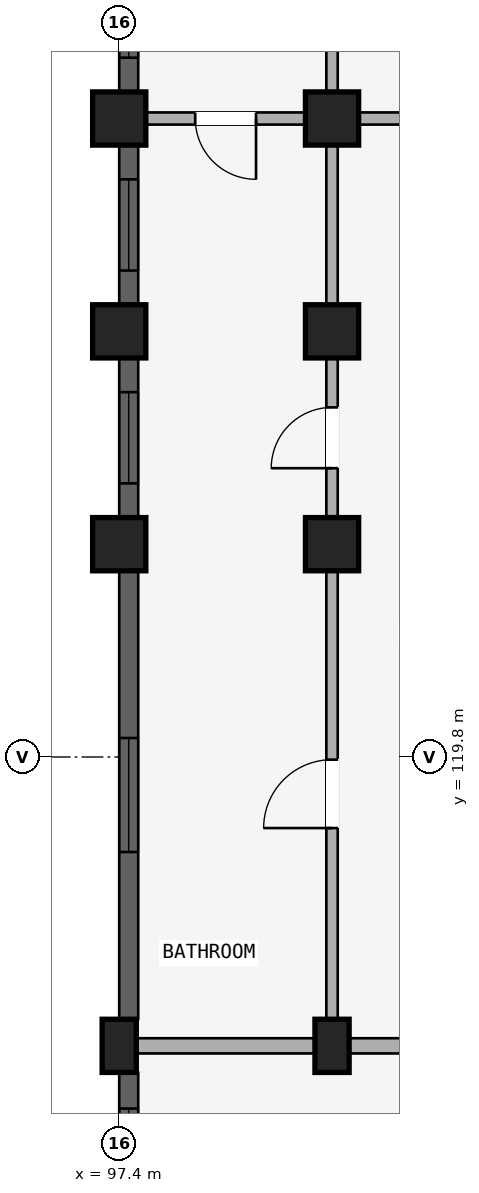
"""IFC4 building model, lengths in metres.
Left out: names, types, materials, properties, quantities, classifications, styles, units other than length and angle.
Written with IfcOpenShell. Run it as: python <this file> out.ifc"""

import sys

from ifc_helpers import new_model, si_unit, direction, frame, frame_2d, origin, origin_2d, place, context, subcontext, project, spatial, rectangle, extrude, element, fill, save


model = new_model("IFC4")
c1 = context("Model", 3, precision=1e-05, world=origin(), true_north=direction((0.0, 1.0)))
c2 = subcontext(c1, "Body", "Model", "MODEL_VIEW")
j1 = project(units=[si_unit("LENGTHUNIT", "METRE"), si_unit("PLANEANGLEUNIT", "RADIAN")], contexts=[c1])
p1 = place(None, origin())
s1 = spatial("IfcSite", under=j1, at=p1, CompositionType="ELEMENT")
p2 = place(p1, origin())
s2 = spatial("IfcBuilding", under=s1, at=p2, CompositionType="ELEMENT")
p3 = place(p2, frame((0.0, 0.0, 21.3)))
s3 = spatial("IfcBuildingStorey", under=s2, at=p3, CompositionType="ELEMENT", Elevation=21.3)
p4 = place(p3, frame((100.2, 116.0, 0.0), z_axis=(0.0, 0.0, 1.0), x_axis=(1.0, 0.0, 0.0)))
e1 = element("IfcColumn", 1, at=p4, inside=s3, PredefinedType="COLUMN", context=c2, shape_type="SweptSolid", body=[
    extrude(rectangle(XDim=0.45, YDim=0.7, at=origin_2d()), origin(), (0.0, 0.0, 1.0), 2.93),
])
for number, where, z_axis, x_axis in (
    (2, (100.2, 122.6, 0.0), (0.0, 0.0, 1.0), (1.0, 0.0, 0.0)),
    (3, (100.2, 125.4, 0.0), (0.0, 0.0, 1.0), (1.0, 0.0, 0.0)),
    (4, (100.2, 128.2, 0.0), (0.0, 0.0, 1.0), (1.0, 0.0, 0.0)),
):
    element("IfcColumn", number, at=place(p3, frame(where, z_axis=z_axis, x_axis=x_axis)), inside=s3, PredefinedType="COLUMN", context=c2, shape_type="SweptSolid", body=[
        extrude(rectangle(XDim=0.7, YDim=0.7, at=origin_2d()), origin(), (0.0, 0.0, 1.0), 2.93),
    ])
p5 = place(p3, frame((97.4, 116.0, 0.0), z_axis=(0.0, 0.0, 1.0), x_axis=(1.0, 0.0, 0.0)))
e5 = element("IfcColumn", 5, at=p5, inside=s3, PredefinedType="COLUMN", context=c2, shape_type="SweptSolid", body=[
    extrude(rectangle(XDim=0.45, YDim=0.7, at=origin_2d()), origin(), (0.0, 0.0, 1.0), 2.93),
])
for number, where, z_axis, x_axis in (
    (6, (97.4, 122.6, 0.0), (0.0, 0.0, 1.0), (1.0, 0.0, 0.0)),
    (7, (97.4, 125.4, 0.0), (0.0, 0.0, 1.0), (1.0, 0.0, 0.0)),
    (8, (97.4, 128.2, 0.0), (0.0, 0.0, 1.0), (1.0, 0.0, 0.0)),
):
    element("IfcColumn", number, at=place(p3, frame(where, z_axis=z_axis, x_axis=x_axis)), inside=s3, PredefinedType="COLUMN", context=c2, shape_type="SweptSolid", body=[
        extrude(rectangle(XDim=0.7, YDim=0.7, at=origin_2d()), origin(), (0.0, 0.0, 1.0), 2.93),
    ])
p6 = place(p3, frame((103.0, 116.0, 0.0), z_axis=(0.0, 0.0, 1.0), x_axis=(-1.0, 0.0, 0.0)))
e9 = element("IfcWall", 9, at=p6, inside=s3, PredefinedType="STANDARD", context=c2, shape_type="SweptSolid", body=[
    extrude(rectangle(XDim=2.8, YDim=0.2, at=frame_2d((1.4, 0.0))), origin(), (0.0, 0.0, 1.0), 2.372),
])
p7 = place(p6, frame((0.9, 0.0, 0.0)))
e10 = element("IfcOpeningElement", 10, at=p7, cuts=e9, PredefinedType="OPENING", context=c2, shape_type="SweptSolid", body=[
    extrude(rectangle(XDim=1.0, YDim=2.15, at=frame_2d((0.5, 1.075))), frame((0.0, 0.11, 0.0), z_axis=(0.0, -1.0, 0.0), x_axis=(1.0, 0.0, 0.0)), (0.0, 0.0, 1.0), 0.22),
])
p8 = place(p3, frame((102.92, 128.2, 0.0), z_axis=(0.0, 0.0, 1.0), x_axis=(-1.0, 0.0, 0.0)))
e11 = element("IfcWall", 11, at=p8, inside=s3, PredefinedType="PLUMBINGWALL", context=c2, shape_type="SweptSolid", body=[
    extrude(rectangle(XDim=2.64, YDim=0.16, at=frame_2d((1.32, 0.0))), origin(), (0.0, 0.0, 1.0), 2.372),
])
p9 = place(p8, frame((0.87, 0.0, 0.0)))
e12 = element("IfcOpeningElement", 12, at=p9, cuts=e11, PredefinedType="OPENING", context=c2, shape_type="SweptSolid", body=[
    extrude(rectangle(XDim=0.9, YDim=2.1, at=frame_2d((0.45, 1.05))), frame((0.0, 0.09, 0.0), z_axis=(0.0, -1.0, 0.0), x_axis=(1.0, 0.0, 0.0)), (0.0, 0.0, 1.0), 0.18),
])
p10 = place(p3, frame((100.2, 116.0, 0.0), z_axis=(0.0, 0.0, 1.0), x_axis=(-1.0, 0.0, 0.0)))
e13 = element("IfcWall", 13, at=p10, inside=s3, PredefinedType="STANDARD", context=c2, shape_type="SweptSolid", body=[
    extrude(rectangle(XDim=2.8, YDim=0.2, at=frame_2d((1.4, 0.0))), origin(), (0.0, 0.0, 1.0), 2.372),
])
p11 = place(p3, frame((100.12, 128.2, 0.0), z_axis=(0.0, 0.0, 1.0), x_axis=(-1.0, 0.0, 0.0)))
e14 = element("IfcWall", 14, at=p11, inside=s3, PredefinedType="PLUMBINGWALL", context=c2, shape_type="SweptSolid", body=[
    extrude(rectangle(XDim=2.64, YDim=0.16, at=frame_2d((1.32, 0.0))), origin(), (0.0, 0.0, 1.0), 2.372),
])
p12 = place(p11, frame((0.92, 0.0, 0.0)))
e15 = element("IfcOpeningElement", 15, at=p12, cuts=e14, PredefinedType="OPENING", context=c2, shape_type="SweptSolid", body=[
    extrude(rectangle(XDim=0.8, YDim=2.1, at=frame_2d((0.4, 1.05))), frame((0.0, 0.09, 0.0), z_axis=(0.0, -1.0, 0.0), x_axis=(1.0, 0.0, 0.0)), (0.0, 0.0, 1.0), 0.18),
])
p13 = place(p3, frame((100.2, 116.05, 0.0), z_axis=(0.0, 0.0, 1.0), x_axis=(0.0, 1.0, 0.0)))
e16 = element("IfcWall", 16, at=p13, inside=s3, PredefinedType="PARTITIONING", context=c2, shape_type="SweptSolid", body=[
    extrude(rectangle(XDim=6.53, YDim=0.15, at=frame_2d((3.265, 0.0))), origin(), (0.0, 0.0, 1.0), 2.372),
])
p14 = place(p13, frame((2.815, 0.0, 0.0)))
e17 = element("IfcOpeningElement", 17, at=p14, cuts=e16, PredefinedType="OPENING", context=c2, shape_type="SweptSolid", body=[
    extrude(rectangle(XDim=0.9, YDim=2.1, at=frame_2d((0.45, 1.05))), frame((0.0, 0.085, 0.0), z_axis=(0.0, -1.0, 0.0), x_axis=(1.0, 0.0, 0.0)), (0.0, 0.0, 1.0), 0.17),
])
p15 = place(p3, frame((100.2, 122.7, 0.0), z_axis=(0.0, 0.0, 1.0), x_axis=(0.0, 1.0, 0.0)))
e18 = element("IfcWall", 18, at=p15, inside=s3, PredefinedType="PARTITIONING", context=c2, shape_type="SweptSolid", body=[
    extrude(rectangle(XDim=10.82, YDim=0.15, at=frame_2d((5.41, 0.0))), origin(), (0.0, 0.0, 1.0), 2.372),
])
p16 = place(p15, frame((0.899, 0.0, 0.0)))
e19 = element("IfcOpeningElement", 19, at=p16, cuts=e18, PredefinedType="OPENING", context=c2, shape_type="SweptSolid", body=[
    extrude(rectangle(XDim=0.8, YDim=2.1, at=frame_2d((0.4, 1.05))), frame((0.0, 0.085, 0.0), z_axis=(0.0, -1.0, 0.0), x_axis=(1.0, 0.0, 0.0)), (0.0, 0.0, 1.0), 0.17),
])
p17 = place(p3, frame((97.525, 113.954, 0.0), z_axis=(0.0, 0.0, 1.0), x_axis=(0.0, 1.0, 0.0)))
e20 = element("IfcWall", 20, at=p17, inside=s3, PredefinedType="STANDARD", context=c2, shape_type="SweptSolid", body=[
    extrude(rectangle(XDim=1.693, YDim=0.25, at=frame_2d((0.846, 0.0))), origin(), (0.0, 0.0, 1.0), 2.372),
])
p18 = place(p17, frame((0.471, 0.0, 0.88)))
e21 = element("IfcOpeningElement", 21, at=p18, cuts=e20, PredefinedType="OPENING", context=c2, shape_type="SweptSolid", body=[
    extrude(rectangle(XDim=0.75, YDim=1.05, at=frame_2d((0.375, 0.525))), frame((0.0, 0.135, 0.0), z_axis=(0.0, -1.0, 0.0), x_axis=(1.0, 0.0, 0.0)), (0.0, 0.0, 1.0), 0.27),
])
p19 = place(p3, frame((97.525, 116.354, 0.0), z_axis=(0.0, 0.0, 1.0), x_axis=(0.0, 1.0, 0.0)))
e22 = element("IfcWall", 22, at=p19, inside=s3, PredefinedType="STANDARD", context=c2, shape_type="SweptSolid", body=[
    extrude(rectangle(XDim=5.893, YDim=0.25, at=frame_2d((2.947, 0.0))), origin(), (0.0, 0.0, 1.0), 2.372),
])
p20 = place(p19, frame((2.197, 0.0, 0.522)))
e23 = element("IfcOpeningElement", 23, at=p20, cuts=e22, PredefinedType="OPENING", context=c2, shape_type="SweptSolid", body=[
    extrude(rectangle(XDim=1.5, YDim=1.65, at=frame_2d((0.75, 0.825))), frame((0.0, 0.135, 0.0), z_axis=(0.0, -1.0, 0.0), x_axis=(1.0, 0.0, 0.0)), (0.0, 0.0, 1.0), 0.27),
])
p21 = place(p3, frame((97.525, 122.954, 0.0), z_axis=(0.0, 0.0, 1.0), x_axis=(0.0, 1.0, 0.0)))
e24 = element("IfcWall", 24, at=p21, inside=s3, PredefinedType="STANDARD", context=c2, shape_type="SweptSolid", body=[
    extrude(rectangle(XDim=2.093, YDim=0.25, at=frame_2d((1.046, 0.0))), origin(), (0.0, 0.0, 1.0), 2.372),
])
p22 = place(p21, frame((0.447, 0.0, 0.672)))
e25 = element("IfcOpeningElement", 25, at=p22, cuts=e24, PredefinedType="OPENING", context=c2, shape_type="SweptSolid", body=[
    extrude(rectangle(XDim=1.2, YDim=1.5, at=frame_2d((0.6, 0.75))), frame((0.0, 0.135, 0.0), z_axis=(0.0, -1.0, 0.0), x_axis=(1.0, 0.0, 0.0)), (0.0, 0.0, 1.0), 0.27),
])
p23 = place(p3, frame((97.525, 125.753, 0.0), z_axis=(0.0, 0.0, 1.0), x_axis=(0.0, 1.0, 0.0)))
e26 = element("IfcWall", 26, at=p23, inside=s3, PredefinedType="STANDARD", context=c2, shape_type="SweptSolid", body=[
    extrude(rectangle(XDim=2.093, YDim=0.25, at=frame_2d((1.046, 0.0))), origin(), (0.0, 0.0, 1.0), 2.372),
])
p24 = place(p23, frame((0.447, 0.0, 0.672)))
e27 = element("IfcOpeningElement", 27, at=p24, cuts=e26, PredefinedType="OPENING", context=c2, shape_type="SweptSolid", body=[
    extrude(rectangle(XDim=1.2, YDim=1.5, at=frame_2d((0.6, 0.75))), frame((0.0, 0.135, 0.0), z_axis=(0.0, -1.0, 0.0), x_axis=(1.0, 0.0, 0.0)), (0.0, 0.0, 1.0), 0.27),
])
p25 = place(p3, frame((97.525, 128.553, 0.0), z_axis=(0.0, 0.0, 1.0), x_axis=(0.0, 1.0, 0.0)))
e28 = element("IfcWall", 28, at=p25, inside=s3, PredefinedType="STANDARD", context=c2, shape_type="SweptSolid", body=[
    extrude(rectangle(XDim=2.093, YDim=0.25, at=frame_2d((1.046, 0.0))), origin(), (0.0, 0.0, 1.0), 2.372),
])
p26 = place(p25, frame((0.447, 0.0, 0.672)))
e29 = element("IfcOpeningElement", 29, at=p26, cuts=e28, PredefinedType="OPENING", context=c2, shape_type="SweptSolid", body=[
    extrude(rectangle(XDim=1.2, YDim=1.5, at=frame_2d((0.6, 0.75))), frame((0.0, 0.135, 0.0), z_axis=(0.0, -1.0, 0.0), x_axis=(1.0, 0.0, 0.0)), (0.0, 0.0, 1.0), 0.27),
])
p27 = place(p18, origin())
e30 = element("IfcWindow", 30, at=p27, inside=s3, PartitioningType="SINGLE_PANEL", PredefinedType="WINDOW", context=c2, shape_type="SweptSolid", body=[
    extrude(rectangle(XDim=0.75, YDim=1.05, at=frame_2d((0.375, 0.525))), frame((0.0, 0.03, 0.0), z_axis=(0.0, -1.0, 0.0), x_axis=(1.0, 0.0, 0.0)), (0.0, 0.0, 1.0), 0.06),
])
fill(e21, e30)
p28 = place(p20, origin())
e31 = element("IfcWindow", 31, at=p28, inside=s3, PartitioningType="DOUBLE_PANEL_VERTICAL", PredefinedType="WINDOW", context=c2, shape_type="SweptSolid", body=[
    extrude(rectangle(XDim=1.5, YDim=1.65, at=frame_2d((0.75, 0.825))), frame((0.0, 0.03, 0.0), z_axis=(0.0, -1.0, 0.0), x_axis=(1.0, 0.0, 0.0)), (0.0, 0.0, 1.0), 0.06),
])
fill(e23, e31)
p29 = place(p22, origin())
e32 = element("IfcWindow", 32, at=p29, inside=s3, PartitioningType="SINGLE_PANEL", PredefinedType="WINDOW", context=c2, shape_type="SweptSolid", body=[
    extrude(rectangle(XDim=1.2, YDim=1.5, at=frame_2d((0.6, 0.75))), frame((0.0, 0.03, 0.0), z_axis=(0.0, -1.0, 0.0), x_axis=(1.0, 0.0, 0.0)), (0.0, 0.0, 1.0), 0.06),
])
fill(e25, e32)
p30 = place(p24, origin())
e33 = element("IfcWindow", 33, at=p30, inside=s3, PartitioningType="SINGLE_PANEL", PredefinedType="WINDOW", context=c2, shape_type="SweptSolid", body=[
    extrude(rectangle(XDim=1.2, YDim=1.5, at=frame_2d((0.6, 0.75))), frame((0.0, 0.03, 0.0), z_axis=(0.0, -1.0, 0.0), x_axis=(1.0, 0.0, 0.0)), (0.0, 0.0, 1.0), 0.06),
])
fill(e27, e33)
p31 = place(p26, origin())
e34 = element("IfcWindow", 34, at=p31, inside=s3, PartitioningType="SINGLE_PANEL", PredefinedType="WINDOW", context=c2, shape_type="SweptSolid", body=[
    extrude(rectangle(XDim=1.2, YDim=1.5, at=frame_2d((0.6, 0.75))), frame((0.0, 0.03, 0.0), z_axis=(0.0, -1.0, 0.0), x_axis=(1.0, 0.0, 0.0)), (0.0, 0.0, 1.0), 0.06),
])
fill(e29, e34)
p32 = place(p12, origin())
e35 = element("IfcDoor", 35, at=p32, inside=s3, OperationType="SINGLE_SWING_LEFT", PredefinedType="DOOR", context=c2, shape_type="SweptSolid", body=[
    extrude(rectangle(XDim=0.8, YDim=2.1, at=frame_2d((0.4, 1.05))), frame((0.0, 0.025, 0.0), z_axis=(0.0, -1.0, 0.0), x_axis=(1.0, 0.0, 0.0)), (0.0, 0.0, 1.0), 0.05),
])
fill(e15, e35)
p33 = place(p14, origin())
e36 = element("IfcDoor", 36, at=p33, inside=s3, OperationType="SINGLE_SWING_LEFT", PredefinedType="DOOR", context=c2, shape_type="SweptSolid", body=[
    extrude(rectangle(XDim=0.9, YDim=2.1, at=frame_2d((0.45, 1.05))), frame((0.0, 0.025, 0.0), z_axis=(0.0, -1.0, 0.0), x_axis=(1.0, 0.0, 0.0)), (0.0, 0.0, 1.0), 0.05),
])
fill(e17, e36)
p34 = place(p16, frame((0.8, 0.0, 0.0), z_axis=(0.0, 0.0, 1.0), x_axis=(-1.0, 0.0, 0.0)))
e37 = element("IfcDoor", 37, at=p34, inside=s3, OperationType="SINGLE_SWING_RIGHT", PredefinedType="DOOR", context=c2, shape_type="SweptSolid", body=[
    extrude(rectangle(XDim=0.8, YDim=2.1, at=frame_2d((0.4, 1.05))), frame((0.0, 0.025, 0.0), z_axis=(0.0, -1.0, 0.0), x_axis=(1.0, 0.0, 0.0)), (0.0, 0.0, 1.0), 0.05),
])
fill(e19, e37)
save(model, sys.argv[1])
